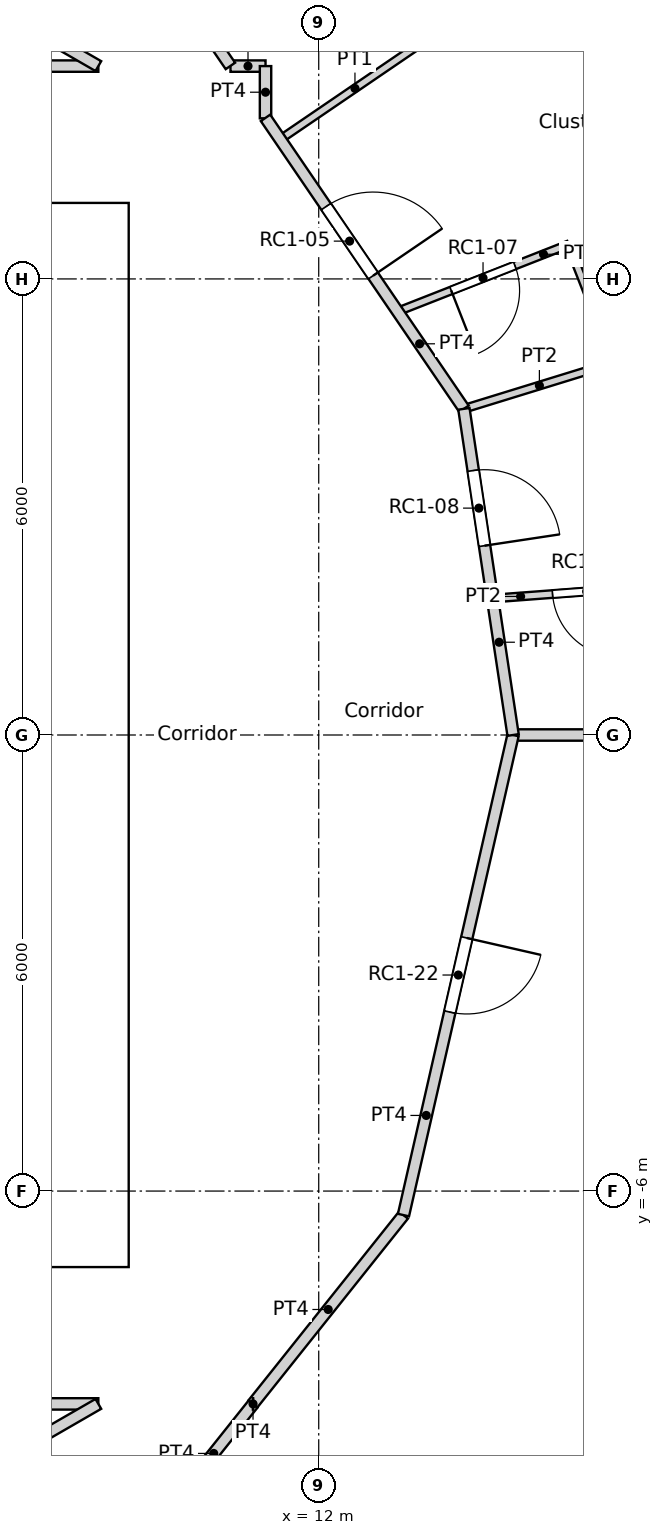
"""IFC4 building model, lengths in metres.
Left out: names, types, materials, properties, quantities, classifications, styles, units other than length and angle.
Written with IfcOpenShell. Run it as: python <this file> out.ifc"""

import sys

from ifc_helpers import new_model, si_unit, direction, frame, frame_2d, origin, place, context, subcontext, project, spatial, rectangle, extrude, element, fill, save


model = new_model("IFC4")
c1 = context("Model", 3, precision=1e-05, world=origin(), true_north=direction((0.0, 1.0)))
c2 = subcontext(c1, "Body", "Model", "MODEL_VIEW")
j1 = project(units=[si_unit("LENGTHUNIT", "METRE"), si_unit("PLANEANGLEUNIT", "RADIAN")], contexts=[c1])
p1 = place(None, origin())
s1 = spatial("IfcSite", under=j1, at=p1, CompositionType="ELEMENT")
p2 = place(p1, origin())
s2 = spatial("IfcBuilding", under=s1, at=p2, CompositionType="ELEMENT")
p3 = place(p2, frame((0.0, 0.0, 231.0)))
s3 = spatial("IfcBuildingStorey", under=s2, at=p3, CompositionType="ELEMENT", Elevation=231.0)
p4 = place(p3, frame((-9.5, -6.7, 0.0), z_axis=(0.0, 0.0, 1.0), x_axis=(1.0, 0.0, 0.0)))
e1 = element("IfcWall", 1, at=p4, inside=s3, PredefinedType="SOLIDWALL", context=c2, shape_type="SweptSolid", body=[
    extrude(rectangle(XDim=19.0, YDim=0.6, at=frame_2d((9.5, 0.0))), origin(), (0.0, 0.0, 1.0), 3.6),
])
p5 = place(p4, frame((10.4, 0.0, 0.0)))
e2 = element("IfcOpeningElement", 2, at=p5, cuts=e1, PredefinedType="OPENING", context=c2, shape_type="SweptSolid", body=[
    extrude(rectangle(XDim=1.0, YDim=2.1, at=frame_2d((0.5, 1.05))), frame((0.0, 0.3, 0.0), z_axis=(0.0, -1.0, 0.0), x_axis=(1.0, 0.0, 0.0)), (0.0, 0.0, 1.0), 0.6),
])
p6 = place(p4, frame((5.35, 0.0, 0.0)))
e3 = element("IfcOpeningElement", 3, at=p6, cuts=e1, PredefinedType="OPENING", context=c2, shape_type="SweptSolid", body=[
    extrude(rectangle(XDim=1.7, YDim=2.1, at=frame_2d((0.85, 1.05))), frame((0.0, 0.3, 0.0), z_axis=(0.0, -1.0, 0.0), x_axis=(1.0, 0.0, 0.0)), (0.0, 0.0, 1.0), 0.6),
])
p7 = place(p4, frame((11.95, 0.0, 0.0)))
e4 = element("IfcOpeningElement", 4, at=p7, cuts=e1, PredefinedType="OPENING", context=c2, shape_type="SweptSolid", body=[
    extrude(rectangle(XDim=1.7, YDim=2.1, at=frame_2d((0.85, 1.05))), frame((0.0, 0.3, 0.0), z_axis=(0.0, -1.0, 0.0), x_axis=(1.0, 0.0, 0.0)), (0.0, 0.0, 1.0), 0.6),
])
p8 = place(p3, frame((-9.5, 6.7, 0.0), z_axis=(0.0, 0.0, 1.0), x_axis=(1.0, 0.0, 0.0)))
e5 = element("IfcWall", 5, at=p8, inside=s3, PredefinedType="SOLIDWALL", context=c2, shape_type="SweptSolid", body=[
    extrude(rectangle(XDim=19.0, YDim=0.6, at=frame_2d((9.5, 0.0))), origin(), (0.0, 0.0, 1.0), 3.6),
])
p9 = place(p8, frame((5.35, 0.0, 0.0)))
e6 = element("IfcOpeningElement", 6, at=p9, cuts=e5, PredefinedType="OPENING", context=c2, shape_type="SweptSolid", body=[
    extrude(rectangle(XDim=1.7, YDim=2.1, at=frame_2d((0.85, 1.05))), frame((0.0, 0.3, 0.0), z_axis=(0.0, -1.0, 0.0), x_axis=(1.0, 0.0, 0.0)), (0.0, 0.0, 1.0), 0.6),
])
p10 = place(p3, frame((9.2, -6.4, 0.0), z_axis=(0.0, 0.0, 1.0), x_axis=(0.0, 1.0, 0.0)))
e7 = element("IfcWall", 7, at=p10, inside=s3, PredefinedType="SOLIDWALL", context=c2, shape_type="SweptSolid", body=[
    extrude(rectangle(XDim=12.8, YDim=0.6, at=frame_2d((6.4, 0.0))), origin(), (0.0, 0.0, 1.0), 3.6),
])
p11 = place(p10, frame((6.4, 0.0, 0.0)))
e8 = element("IfcOpeningElement", 8, at=p11, cuts=e7, PredefinedType="OPENING", context=c2, shape_type="SweptSolid", body=[
    extrude(rectangle(XDim=1.8, YDim=2.1, at=frame_2d((0.9, 1.05))), frame((0.0, 0.3, 0.0), z_axis=(0.0, -1.0, 0.0), x_axis=(1.0, 0.0, 0.0)), (0.0, 0.0, 1.0), 0.6),
])
p12 = place(p3, frame((2.1, -3.1, 0.0), z_axis=(0.0, 0.0, 1.0), x_axis=(1.0, 0.0, 0.0)))
e9 = element("IfcWall", 9, at=p12, inside=s3, PredefinedType="SOLIDWALL", context=c2, shape_type="SweptSolid", body=[
    extrude(rectangle(XDim=6.8, YDim=0.3, at=frame_2d((3.4, 0.0))), origin(), (0.0, 0.0, 1.0), 3.25),
])
p13 = place(p12, frame((0.35, 0.0, 0.0)))
e10 = element("IfcOpeningElement", 10, at=p13, cuts=e9, PredefinedType="OPENING", context=c2, shape_type="SweptSolid", body=[
    extrude(rectangle(XDim=1.7, YDim=2.1, at=frame_2d((0.85, 1.05))), frame((0.0, 0.15, 0.0), z_axis=(0.0, -1.0, 0.0), x_axis=(1.0, 0.0, 0.0)), (0.0, 0.0, 1.0), 0.3),
])
p14 = place(p3, frame((-4.35, 3.1, 0.0), z_axis=(0.0, 0.0, 1.0), x_axis=(1.0, 0.0, 0.0)))
e11 = element("IfcWall", 11, at=p14, inside=s3, PredefinedType="SOLIDWALL", context=c2, shape_type="SweptSolid", body=[
    extrude(rectangle(XDim=13.25, YDim=0.3, at=frame_2d((6.625, 0.0))), origin(), (0.0, 0.0, 1.0), 3.25),
])
p15 = place(p14, frame((2.95, 0.0, 0.0)))
e12 = element("IfcOpeningElement", 12, at=p15, cuts=e11, PredefinedType="OPENING", context=c2, shape_type="SweptSolid", body=[
    extrude(rectangle(XDim=1.1, YDim=2.1, at=frame_2d((0.55, 1.05))), frame((0.0, 0.15, 0.0), z_axis=(0.0, -1.0, 0.0), x_axis=(1.0, 0.0, 0.0)), (0.0, 0.0, 1.0), 0.3),
])
p16 = place(p14, frame((5.75, 0.0, 0.0)))
e13 = element("IfcOpeningElement", 13, at=p16, cuts=e11, PredefinedType="OPENING", context=c2, shape_type="SweptSolid", body=[
    extrude(rectangle(XDim=1.1, YDim=2.1, at=frame_2d((0.55, 1.05))), frame((0.0, 0.15, 0.0), z_axis=(0.0, -1.0, 0.0), x_axis=(1.0, 0.0, 0.0)), (0.0, 0.0, 1.0), 0.3),
])
p17 = place(p14, frame((8.55, 0.0, 0.0)))
e14 = element("IfcOpeningElement", 14, at=p17, cuts=e11, PredefinedType="OPENING", context=c2, shape_type="SweptSolid", body=[
    extrude(rectangle(XDim=1.1, YDim=2.1, at=frame_2d((0.55, 1.05))), frame((0.0, 0.15, 0.0), z_axis=(0.0, -1.0, 0.0), x_axis=(1.0, 0.0, 0.0)), (0.0, 0.0, 1.0), 0.3),
])
p18 = place(p3, frame((4.225, -0.425, 0.0), z_axis=(0.0, 0.0, 1.0), x_axis=(1.0, 0.0, 0.0)))
e15 = element("IfcWall", 15, at=p18, inside=s3, PredefinedType="SOLIDWALL", context=c2, shape_type="SweptSolid", body=[
    extrude(rectangle(XDim=4.675, YDim=0.15, at=frame_2d((2.337, 0.0))), origin(), (0.0, 0.0, 1.0), 3.25),
])
p19 = place(p18, frame((0.312, 0.0, 0.0)))
e16 = element("IfcOpeningElement", 16, at=p19, cuts=e15, PredefinedType="OPENING", context=c2, shape_type="SweptSolid", body=[
    extrude(rectangle(XDim=0.9, YDim=2.1, at=frame_2d((0.45, 1.05))), frame((0.0, 0.075, 0.0), z_axis=(0.0, -1.0, 0.0), x_axis=(1.0, 0.0, 0.0)), (0.0, 0.0, 1.0), 0.15),
])
p20 = place(p18, frame((1.725, 0.0, 0.0)))
e17 = element("IfcOpeningElement", 17, at=p20, cuts=e15, PredefinedType="OPENING", context=c2, shape_type="SweptSolid", body=[
    extrude(rectangle(XDim=0.9, YDim=2.1, at=frame_2d((0.45, 1.05))), frame((0.0, 0.075, 0.0), z_axis=(0.0, -1.0, 0.0), x_axis=(1.0, 0.0, 0.0)), (0.0, 0.0, 1.0), 0.15),
])
p21 = place(p18, frame((3.375, 0.0, 0.0)))
e18 = element("IfcOpeningElement", 18, at=p21, cuts=e15, PredefinedType="OPENING", context=c2, shape_type="SweptSolid", body=[
    extrude(rectangle(XDim=0.9, YDim=2.1, at=frame_2d((0.45, 1.05))), frame((0.0, 0.075, 0.0), z_axis=(0.0, -1.0, 0.0), x_axis=(1.0, 0.0, 0.0)), (0.0, 0.0, 1.0), 0.15),
])
p22 = place(p3, frame((0.896, 8.8, 0.0), z_axis=(0.0, 0.0, 1.0), x_axis=(1.0, 0.0, 0.0)))
e19 = element("IfcWall", 19, at=p22, inside=s3, PredefinedType="PARTITIONING", context=c2, shape_type="SweptSolid", body=[
    extrude(rectangle(XDim=8.205, YDim=0.15, at=frame_2d((4.102, 0.0))), origin(), (0.0, 0.0, 1.0), 3.25),
])
p23 = place(p22, frame((3.598, 0.0, 0.0)))
e20 = element("IfcOpeningElement", 20, at=p23, cuts=e19, PredefinedType="OPENING", context=c2, shape_type="SweptSolid", body=[
    extrude(rectangle(XDim=1.0, YDim=2.04, at=frame_2d((0.5, 1.02))), frame((0.0, 0.075, 0.0), z_axis=(0.0, -1.0, 0.0), x_axis=(1.0, 0.0, 0.0)), (0.0, 0.0, 1.0), 0.15),
])
p24 = place(p3, frame((9.075, 11.381, 0.0), z_axis=(0.0, 0.0, 1.0), x_axis=(0.564277533473, -0.825585165333, 0.0)))
e21 = element("IfcWall", 21, at=p24, inside=s3, PredefinedType="PARTITIONING", context=c2, shape_type="SweptSolid", body=[
    extrude(rectangle(XDim=3.123, YDim=0.15, at=frame_2d((1.562, 0.0))), origin(), (0.0, 0.0, 1.0), 3.25),
])
p25 = place(p3, frame((10.839, 8.8, 0.0), z_axis=(0.0, 0.0, 1.0), x_axis=(1.0, 0.0, 0.0)))
e22 = element("IfcWall", 22, at=p25, inside=s3, PredefinedType="PARTITIONING", context=c2, shape_type="SweptSolid", body=[
    extrude(rectangle(XDim=0.461, YDim=0.15, at=frame_2d((0.23, 0.0))), origin(), (0.0, 0.0, 1.0), 3.25),
])
p26 = place(p3, frame((11.3, 8.113, 0.0), z_axis=(0.0, 0.0, 1.0), x_axis=(0.0, 1.0, 0.0)))
e23 = element("IfcWall", 23, at=p26, inside=s3, PredefinedType="PARTITIONING", context=c2, shape_type="SweptSolid", body=[
    extrude(rectangle(XDim=0.687, YDim=0.15, at=frame_2d((0.344, 0.0))), origin(), (0.0, 0.0, 1.0), 3.25),
])
p27 = place(p3, frame((0.896, -8.8, 0.0), z_axis=(0.0, 0.0, 1.0), x_axis=(1.0, 0.0, 0.0)))
e24 = element("IfcWall", 24, at=p27, inside=s3, PredefinedType="PARTITIONING", context=c2, shape_type="SweptSolid", body=[
    extrude(rectangle(XDim=8.205, YDim=0.15, at=frame_2d((4.102, 0.0))), origin(), (0.0, 0.0, 1.0), 3.25),
])
p28 = place(p27, frame((3.598, 0.0, 0.0)))
e25 = element("IfcOpeningElement", 25, at=p28, cuts=e24, PredefinedType="OPENING", context=c2, shape_type="SweptSolid", body=[
    extrude(rectangle(XDim=1.0, YDim=2.04, at=frame_2d((0.5, 1.02))), frame((0.0, 0.075, 0.0), z_axis=(0.0, -1.0, 0.0), x_axis=(1.0, 0.0, 0.0)), (0.0, 0.0, 1.0), 0.15),
])
p29 = place(p3, frame((11.137, -8.8, 0.0), z_axis=(0.0, 0.0, 1.0), x_axis=(-1.0, 0.0, 0.0)))
e26 = element("IfcWall", 26, at=p29, inside=s3, PredefinedType="PARTITIONING", context=c2, shape_type="SweptSolid", body=[
    extrude(rectangle(XDim=0.003, YDim=0.15, at=frame_2d((0.001, 0.0))), origin(), (0.0, 0.0, 1.0), 3.25),
])
p30 = place(p3, frame((10.101, -10.101, 0.0), z_axis=(0.0, 0.0, 1.0), x_axis=(0.623098344652, 0.782143498913, 0.0)))
e27 = element("IfcWall", 27, at=p30, inside=s3, PredefinedType="PARTITIONING", context=c2, shape_type="SweptSolid", body=[
    extrude(rectangle(XDim=1.661, YDim=0.15, at=frame_2d((0.831, 0.0))), origin(), (0.0, 0.0, 1.0), 3.25),
])
p31 = place(p3, frame((11.3, 8.119, 0.0), z_axis=(0.0, 0.0, 1.0), x_axis=(0.56348561488, -0.82612587529, 0.0)))
e28 = element("IfcWall", 28, at=p31, inside=s3, PredefinedType="PARTITIONING", context=c2, shape_type="SweptSolid", body=[
    extrude(rectangle(XDim=4.633, YDim=0.15, at=frame_2d((2.316, 0.0))), origin(), (0.0, 0.0, 1.0), 3.25),
])
p32 = place(p31, frame((1.413, 0.0, 0.0)))
e29 = element("IfcOpeningElement", 29, at=p32, cuts=e28, PredefinedType="OPENING", context=c2, shape_type="SweptSolid", body=[
    extrude(rectangle(XDim=1.1, YDim=2.1, at=frame_2d((0.55, 1.05))), frame((0.0, 0.075, 0.0), z_axis=(0.0, -1.0, 0.0), x_axis=(1.0, 0.0, 0.0)), (0.0, 0.0, 1.0), 0.15),
])
p33 = place(p3, frame((13.91, 4.291, 0.0), z_axis=(0.0, 0.0, 1.0), x_axis=(0.149143716951, -0.988815529659, 0.0)))
e30 = element("IfcWall", 30, at=p33, inside=s3, PredefinedType="PARTITIONING", context=c2, shape_type="SweptSolid", body=[
    extrude(rectangle(XDim=4.34, YDim=0.15, at=frame_2d((2.17, 0.0))), origin(), (0.0, 0.0, 1.0), 3.25),
])
p34 = place(p33, frame((0.821, 0.0, 0.0)))
e31 = element("IfcOpeningElement", 31, at=p34, cuts=e30, PredefinedType="OPENING", context=c2, shape_type="SweptSolid", body=[
    extrude(rectangle(XDim=1.0, YDim=2.1, at=frame_2d((0.5, 1.05))), frame((0.0, 0.075, 0.0), z_axis=(0.0, -1.0, 0.0), x_axis=(1.0, 0.0, 0.0)), (0.0, 0.0, 1.0), 0.15),
])
p35 = place(p3, frame((13.115, -6.316, 0.0), z_axis=(0.0, 0.0, 1.0), x_axis=(0.222568978642, 0.97491694505, 0.0)))
e32 = element("IfcWall", 32, at=p35, inside=s3, PredefinedType="PARTITIONING", context=c2, shape_type="SweptSolid", body=[
    extrude(rectangle(XDim=6.479, YDim=0.15, at=frame_2d((3.239, 0.0))), origin(), (0.0, 0.0, 1.0), 3.25),
])
p36 = place(p35, frame((2.74, 0.0, 0.0)))
e33 = element("IfcOpeningElement", 33, at=p36, cuts=e32, PredefinedType="OPENING", context=c2, shape_type="SweptSolid", body=[
    extrude(rectangle(XDim=1.0, YDim=2.04, at=frame_2d((0.5, 1.02))), frame((0.0, 0.075, 0.0), z_axis=(0.0, -1.0, 0.0), x_axis=(1.0, 0.0, 0.0)), (0.0, 0.0, 1.0), 0.15),
])
p37 = place(p3, frame((11.134, -8.8, 0.0), z_axis=(0.0, 0.0, 1.0), x_axis=(0.623476099415, 0.781842409606, 0.0)))
e34 = element("IfcWall", 34, at=p37, inside=s3, PredefinedType="PARTITIONING", context=c2, shape_type="SweptSolid", body=[
    extrude(rectangle(XDim=3.177, YDim=0.15, at=frame_2d((1.589, 0.0))), origin(), (0.0, 0.0, 1.0), 3.25),
])
for number, where, z_axis, x_axis in (
    (35, (3.261, 12.171, 0.0), (0.0, 0.0, 1.0), (0.866, -0.5, 0.0)),
    (36, (3.261, -12.171, 0.0), (0.0, 0.0, 1.0), (0.866, 0.5, 0.0)),
):
    element("IfcWall", number, at=place(p3, frame(where, z_axis=z_axis, x_axis=x_axis)), inside=s3, PredefinedType="PARTITIONING", context=c2, shape_type="SweptSolid", body=[
        extrude(rectangle(XDim=6.743, YDim=0.15, at=frame_2d((3.371, 0.0))), origin(), (0.0, 0.0, 1.0), 3.25),
    ])
p38 = place(p3, frame((11.493, 7.836, 0.0), z_axis=(0.0, 0.0, 1.0), x_axis=(0.826231748746, 0.563330362544, 0.0)))
e37 = element("IfcWall", 37, at=p38, inside=s3, PredefinedType="PARTITIONING", context=c2, shape_type="SweptSolid", body=[
    extrude(rectangle(XDim=5.862, YDim=0.1, at=frame_2d((2.931, 0.0))), origin(), (0.0, 0.0, 1.0), 3.25),
])
p39 = place(p38, frame((2.431, 0.0, 0.0)))
e38 = element("IfcOpeningElement", 38, at=p39, cuts=e37, PredefinedType="OPENING", context=c2, shape_type="SweptSolid", body=[
    extrude(rectangle(XDim=1.0, YDim=2.04, at=frame_2d((0.5, 1.02))), frame((0.0, 0.05, 0.0), z_axis=(0.0, -1.0, 0.0), x_axis=(1.0, 0.0, 0.0)), (0.0, 0.0, 1.0), 0.1),
])
p40 = place(p3, frame((15.287, 6.454, 0.0), z_axis=(0.0, 0.0, 1.0), x_axis=(0.365620622357, -0.930763966056, 0.0)))
e39 = element("IfcWall", 39, at=p40, inside=s3, PredefinedType="PARTITIONING", context=c2, shape_type="SweptSolid", body=[
    extrude(rectangle(XDim=1.665, YDim=0.1, at=frame_2d((0.833, 0.0))), origin(), (0.0, 0.0, 1.0), 3.25),
])
p41 = place(p3, frame((13.037, 5.571, 0.0), z_axis=(0.0, 0.0, 1.0), x_axis=(0.930874211086, 0.365339846083, 0.0)))
e40 = element("IfcWall", 40, at=p41, inside=s3, PredefinedType="PARTITIONING", context=c2, shape_type="SweptSolid", body=[
    extrude(rectangle(XDim=2.417, YDim=0.1, at=frame_2d((1.208, 0.0))), origin(), (0.0, 0.0, 1.0), 3.25),
])
p42 = place(p41, frame((0.758, 0.0, 0.0)))
e41 = element("IfcOpeningElement", 41, at=p42, cuts=e40, PredefinedType="OPENING", context=c2, shape_type="SweptSolid", body=[
    extrude(rectangle(XDim=0.9, YDim=2.0, at=frame_2d((0.45, 1.0))), frame((0.0, 0.05, 0.0), z_axis=(0.0, -1.0, 0.0), x_axis=(1.0, 0.0, 0.0)), (0.0, 0.0, 1.0), 0.1),
])
p43 = place(p3, frame((13.91, 4.291, 0.0), z_axis=(0.0, 0.0, 1.0), x_axis=(0.955649377322, 0.294506821014, 0.0)))
e42 = element("IfcWall", 42, at=p43, inside=s3, PredefinedType="PARTITIONING", context=c2, shape_type="SweptSolid", body=[
    extrude(rectangle(XDim=2.078, YDim=0.1, at=frame_2d((1.039, 0.0))), origin(), (0.0, 0.0, 1.0), 3.25),
])
p44 = place(p3, frame((14.286, 1.795, 0.0), z_axis=(0.0, 0.0, 1.0), x_axis=(0.997189401658, 0.074921940846, 0.0)))
e43 = element("IfcWall", 43, at=p44, inside=s3, PredefinedType="PARTITIONING", context=c2, shape_type="SweptSolid", body=[
    extrude(rectangle(XDim=2.483, YDim=0.1, at=frame_2d((1.242, 0.0))), origin(), (0.0, 0.0, 1.0), 3.25),
])
p45 = place(p44, frame((0.792, 0.0, 0.0)))
e44 = element("IfcOpeningElement", 44, at=p45, cuts=e43, PredefinedType="OPENING", context=c2, shape_type="SweptSolid", body=[
    extrude(rectangle(XDim=0.9, YDim=2.04, at=frame_2d((0.45, 1.02))), frame((0.0, 0.05, 0.0), z_axis=(0.0, -1.0, 0.0), x_axis=(1.0, 0.0, 0.0)), (0.0, 0.0, 1.0), 0.1),
])
p46 = place(p3, frame((14.557, 0.0, 0.0), z_axis=(0.0, 0.0, 1.0), x_axis=(1.0, 0.0, 0.0)))
e45 = element("IfcWall", 45, at=p46, inside=s3, PredefinedType="PARTITIONING", context=c2, shape_type="SweptSolid", body=[
    extrude(rectangle(XDim=5.214, YDim=0.15, at=frame_2d((2.607, 0.0))), origin(), (0.0, 0.0, 1.0), 3.25),
])
p47 = place(p11, origin())
e46 = element("IfcDoor", 46, at=p47, inside=s3, OperationType="DOUBLE_DOOR_SINGLE_SWING", PredefinedType="DOOR", context=c2, shape_type="SweptSolid", body=[
    extrude(rectangle(XDim=1.8, YDim=2.1, at=frame_2d((0.9, 1.05))), frame((0.0, 0.025, 0.0), z_axis=(0.0, -1.0, 0.0), x_axis=(1.0, 0.0, 0.0)), (0.0, 0.0, 1.0), 0.05),
])
fill(e8, e46)
p48 = place(p32, origin())
e47 = element("IfcDoor", 47, at=p48, inside=s3, OperationType="SINGLE_SWING_RIGHT", PredefinedType="DOOR", context=c2, shape_type="SweptSolid", body=[
    extrude(rectangle(XDim=1.1, YDim=2.1, at=frame_2d((0.55, 1.05))), frame((0.0, 0.025, 0.0), z_axis=(0.0, -1.0, 0.0), x_axis=(1.0, 0.0, 0.0)), (0.0, 0.0, 1.0), 0.05),
])
fill(e29, e47)
p49 = place(p42, origin())
e48 = element("IfcDoor", 48, at=p49, inside=s3, OperationType="SINGLE_SWING_RIGHT", PredefinedType="DOOR", context=c2, shape_type="SweptSolid", body=[
    extrude(rectangle(XDim=0.9, YDim=2.0, at=frame_2d((0.45, 1.0))), frame((0.0, 0.025, 0.0), z_axis=(0.0, -1.0, 0.0), x_axis=(1.0, 0.0, 0.0)), (0.0, 0.0, 1.0), 0.05),
])
fill(e41, e48)
p50 = place(p34, origin())
e49 = element("IfcDoor", 49, at=p50, inside=s3, OperationType="SINGLE_SWING_RIGHT", PredefinedType="DOOR", context=c2, shape_type="SweptSolid", body=[
    extrude(rectangle(XDim=1.0, YDim=2.1, at=frame_2d((0.5, 1.05))), frame((0.0, 0.025, 0.0), z_axis=(0.0, -1.0, 0.0), x_axis=(1.0, 0.0, 0.0)), (0.0, 0.0, 1.0), 0.05),
])
fill(e31, e49)
p51 = place(p45, origin())
e50 = element("IfcDoor", 50, at=p51, inside=s3, OperationType="SINGLE_SWING_LEFT", PredefinedType="DOOR", context=c2, shape_type="SweptSolid", body=[
    extrude(rectangle(XDim=0.9, YDim=2.04, at=frame_2d((0.45, 1.02))), frame((0.0, 0.025, 0.0), z_axis=(0.0, -1.0, 0.0), x_axis=(1.0, 0.0, 0.0)), (0.0, 0.0, 1.0), 0.05),
])
fill(e44, e50)
p52 = place(p36, origin())
e51 = element("IfcDoor", 51, at=p52, inside=s3, OperationType="SINGLE_SWING_LEFT", PredefinedType="DOOR", context=c2, shape_type="SweptSolid", body=[
    extrude(rectangle(XDim=1.0, YDim=2.04, at=frame_2d((0.5, 1.02))), frame((0.0, 0.025, 0.0), z_axis=(0.0, -1.0, 0.0), x_axis=(1.0, 0.0, 0.0)), (0.0, 0.0, 1.0), 0.05),
])
fill(e33, e51)
save(model, sys.argv[1])
